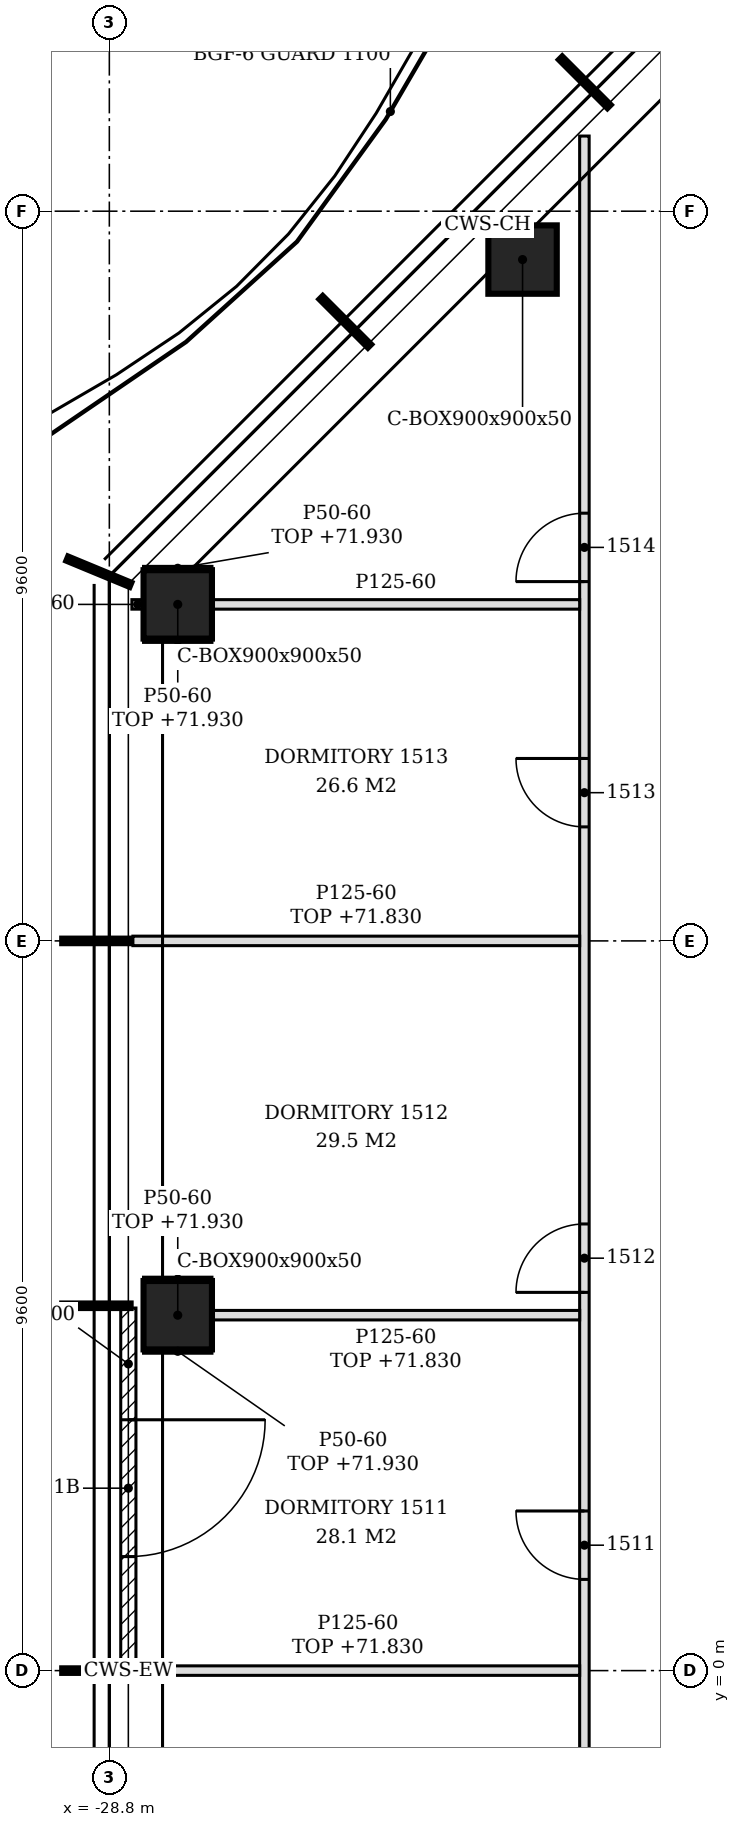
"""IFC4 building model, lengths in metres.
Left out: names, types, materials, properties, quantities, classifications, styles, units other than length and angle.
Written with IfcOpenShell. Run it as: python <this file> out.ifc"""

import sys

from ifc_helpers import new_model, si_unit, direction, frame, frame_2d, origin, origin_2d, place, context, subcontext, project, spatial, polyline, rectangle, hollow_rectangle, outline, extrude, element, fill, save


model = new_model("IFC4")
c1 = context("Model", 3, precision=1e-05, world=origin(), true_north=direction((0.0, 1.0)))
c2 = subcontext(c1, "Body", "Model", "MODEL_VIEW")
j1 = project(units=[si_unit("LENGTHUNIT", "METRE"), si_unit("PLANEANGLEUNIT", "RADIAN")], contexts=[c1])
p1 = place(None, origin())
s1 = spatial("IfcSite", under=j1, at=p1, CompositionType="ELEMENT")
p2 = place(p1, origin())
s2 = spatial("IfcBuilding", under=s1, at=p2, CompositionType="ELEMENT")
p3 = place(p2, frame((0.0, 0.0, 69.0)))
s3 = spatial("IfcBuildingStorey", under=s2, at=p3, CompositionType="ELEMENT", Elevation=69.0)
for number, where, z_axis, x_axis in (
    (1, (-23.364, 18.564, -0.15), (0.0, 0.0, 1.0), (1.0, 0.0, 0.0)),
    (2, (-27.9, 14.027, -0.15), (0.0, 0.0, 1.0), (1.0, 0.0, 0.0)),
    (3, (-27.9, 4.676, -0.15), (0.0, 0.0, 1.0), (1.0, 0.0, 0.0)),
):
    element("IfcColumn", number, at=place(p3, frame(where, z_axis=z_axis, x_axis=x_axis)), inside=s3, PredefinedType="COLUMN", context=c2, shape_type="SweptSolid", body=[
        extrude(hollow_rectangle(XDim=0.9, YDim=0.9, WallThickness=0.05, at=origin_2d()), origin(), (0.0, 0.0, 1.0), 3.6),
    ])
p4 = place(p3, frame((-28.55, 4.77, 0.0), z_axis=(0.0, 0.0, 1.0), x_axis=(0.0, -1.0, 0.0)))
e4 = element("IfcWall", 4, at=p4, inside=s3, PredefinedType="NOTDEFINED", context=c2, shape_type="SweptSolid", body=[
    extrude(rectangle(XDim=4.74, YDim=0.2, at=frame_2d((2.37, 0.0))), origin(), (0.0, 0.0, 1.0), 3.45),
])
p5 = place(p4, frame((1.47, 0.0, 0.0)))
e5 = element("IfcOpeningElement", 5, at=p5, cuts=e4, PredefinedType="OPENING", context=c2, shape_type="SweptSolid", body=[
    extrude(rectangle(XDim=1.8, YDim=2.4, at=frame_2d((0.9, 1.2))), frame((0.0, 0.11, 0.0), z_axis=(0.0, -1.0, 0.0), x_axis=(1.0, 0.0, 0.0)), (0.0, 0.0, 1.0), 0.22),
])
p6 = place(p3, frame((-22.55, -16.087, 0.0), z_axis=(0.0, 0.0, 1.0), x_axis=(0.0, 1.0, 0.0)))
e6 = element("IfcWall", 6, at=p6, inside=s3, PredefinedType="PARTITIONING", context=c2, shape_type="SweptSolid", body=[
    extrude(outline(polyline([(0.0, 0.0), (36.276, 0.0), (36.276, 3.45), (36.022, 3.45), (36.02, 2.63), (34.907, 2.63), (34.905, 3.45), (30.597, 3.45), (30.595, 2.83), (30.377, 2.83), (30.375, 3.45), (25.798, 3.45), (25.795, 2.83), (25.577, 2.83), (25.575, 3.45), (20.998, 3.45), (20.996, 2.83), (20.778, 2.83), (20.775, 3.45), (16.198, 3.45), (16.196, 2.83), (15.978, 2.83), (15.976, 3.45), (11.397, 3.45), (11.396, 2.83), (11.177, 2.83), (11.176, 3.45), (6.597, 3.45), (6.595, 2.83), (6.377, 2.83), (6.375, 3.45), (1.798, 3.45), (1.795, 2.83), (1.577, 2.83), (1.575, 3.45), (0.0, 3.45), (0.0, 0.0)])), frame((0.0, 0.062, 0.0), z_axis=(0.0, -1.0, 0.0), x_axis=(1.0, 0.0, 0.0)), (0.0, 0.0, 1.0), 0.125),
])
p7 = place(p6, frame((10.137, 0.0, 0.0)))
e7 = element("IfcOpeningElement", 7, at=p7, cuts=e6, PredefinedType="OPENING", context=c2, shape_type="SweptSolid", body=[
    extrude(rectangle(XDim=0.9, YDim=2.1, at=frame_2d((0.45, 1.05))), frame((0.0, 0.073, 0.0), z_axis=(0.0, -1.0, 0.0), x_axis=(1.0, 0.0, 0.0)), (0.0, 0.0, 1.0), 0.145),
])
p8 = place(p6, frame((11.711, 0.0, 0.0)))
e8 = element("IfcOpeningElement", 8, at=p8, cuts=e6, PredefinedType="OPENING", context=c2, shape_type="SweptSolid", body=[
    extrude(rectangle(XDim=0.9, YDim=2.1, at=frame_2d((0.45, 1.05))), frame((0.0, 0.073, 0.0), z_axis=(0.0, -1.0, 0.0), x_axis=(1.0, 0.0, 0.0)), (0.0, 0.0, 1.0), 0.145),
])
p9 = place(p6, frame((17.288, 0.0, 0.0)))
e9 = element("IfcOpeningElement", 9, at=p9, cuts=e6, PredefinedType="OPENING", context=c2, shape_type="SweptSolid", body=[
    extrude(rectangle(XDim=0.9, YDim=2.1, at=frame_2d((0.45, 1.05))), frame((0.0, 0.073, 0.0), z_axis=(0.0, -1.0, 0.0), x_axis=(1.0, 0.0, 0.0)), (0.0, 0.0, 1.0), 0.145),
])
p10 = place(p6, frame((21.063, 0.0, 0.0)))
e10 = element("IfcOpeningElement", 10, at=p10, cuts=e6, PredefinedType="OPENING", context=c2, shape_type="SweptSolid", body=[
    extrude(rectangle(XDim=0.9, YDim=2.1, at=frame_2d((0.45, 1.05))), frame((0.0, 0.073, 0.0), z_axis=(0.0, -1.0, 0.0), x_axis=(1.0, 0.0, 0.0)), (0.0, 0.0, 1.0), 0.145),
])
p11 = place(p6, frame((27.188, 0.0, 0.0)))
e11 = element("IfcOpeningElement", 11, at=p11, cuts=e6, PredefinedType="OPENING", context=c2, shape_type="SweptSolid", body=[
    extrude(rectangle(XDim=0.9, YDim=2.1, at=frame_2d((0.45, 1.05))), frame((0.0, 0.073, 0.0), z_axis=(0.0, -1.0, 0.0), x_axis=(1.0, 0.0, 0.0)), (0.0, 0.0, 1.0), 0.145),
])
p12 = place(p6, frame((30.415, 0.0, 0.0)))
e12 = element("IfcOpeningElement", 12, at=p12, cuts=e6, PredefinedType="OPENING", context=c2, shape_type="SweptSolid", body=[
    extrude(rectangle(XDim=0.9, YDim=2.1, at=frame_2d((0.45, 1.05))), frame((0.0, 0.073, 0.0), z_axis=(0.0, -1.0, 0.0), x_axis=(1.0, 0.0, 0.0)), (0.0, 0.0, 1.0), 0.145),
])
p13 = place(p3, frame((-28.45, 0.0, 0.0), z_axis=(0.0, 0.0, 1.0), x_axis=(1.0, 0.0, 0.0)))
e13 = element("IfcWall", 13, at=p13, inside=s3, PredefinedType="PARTITIONING", context=c2, shape_type="SweptSolid", body=[
    extrude(rectangle(XDim=5.837, YDim=0.125, at=frame_2d((2.919, 0.0))), origin(), (0.0, 0.0, 1.0), 2.83),
])
p14 = place(p3, frame((-27.45, 4.676, 0.0), z_axis=(0.0, 0.0, 1.0), x_axis=(1.0, 0.0, 0.0)))
e14 = element("IfcWall", 14, at=p14, inside=s3, PredefinedType="PARTITIONING", context=c2, shape_type="SweptSolid", body=[
    extrude(rectangle(XDim=4.837, YDim=0.125, at=frame_2d((2.419, 0.0))), origin(), (0.0, 0.0, 1.0), 2.83),
])
p15 = place(p3, frame((-28.49, 9.6, 0.0), z_axis=(0.0, 0.0, 1.0), x_axis=(1.0, 0.0, 0.0)))
e15 = element("IfcWall", 15, at=p15, inside=s3, PredefinedType="PARTITIONING", context=c2, shape_type="SweptSolid", body=[
    extrude(rectangle(XDim=5.877, YDim=0.125, at=frame_2d((2.939, 0.0))), origin(), (0.0, 0.0, 1.0), 2.83),
])
p16 = place(p3, frame((-28.503, 14.027, 0.0), z_axis=(0.0, 0.0, 1.0), x_axis=(1.0, 0.0, 0.0)))
e16 = element("IfcWall", 16, at=p16, inside=s3, PredefinedType="PARTITIONING", context=c2, shape_type="SweptSolid", body=[
    extrude(rectangle(XDim=0.153, YDim=0.125, at=frame_2d((0.076, 0.0))), origin(), (0.0, 0.0, 1.0), 3.45),
])
p17 = place(p3, frame((-27.45, 14.027, 0.0), z_axis=(0.0, 0.0, 1.0), x_axis=(1.0, 0.0, 0.0)))
e17 = element("IfcWall", 17, at=p17, inside=s3, PredefinedType="PARTITIONING", context=c2, shape_type="SweptSolid", body=[
    extrude(rectangle(XDim=4.837, YDim=0.125, at=frame_2d((2.419, 0.0))), origin(), (0.0, 0.0, 1.0), 3.45),
])
for number, where, z_axis, x_axis in (
    (18, (-28.35, 5.151, 0.0), (0.0, 0.0, 1.0), (1.0, 0.0, 0.0)),
    (19, (-28.35, 4.201, 0.0), (0.0, 0.0, 1.0), (1.0, 0.0, 0.0)),
    (20, (-28.35, 14.502, 0.0), (0.0, 0.0, 1.0), (1.0, 0.0, 0.0)),
    (21, (-28.35, 13.552, 0.0), (0.0, 0.0, 1.0), (1.0, 0.0, 0.0)),
):
    element("IfcWall", number, at=place(p3, frame(where, z_axis=z_axis, x_axis=x_axis)), inside=s3, PredefinedType="PARTITIONING", context=c2, shape_type="SweptSolid", body=[
        extrude(rectangle(XDim=0.9, YDim=0.05, at=frame_2d((0.45, 0.0))), origin(), (0.0, 0.0, 1.0), 2.93),
    ])
p18 = place(p5, origin())
e22 = element("IfcDoor", 22, at=p18, inside=s3, OperationType="SINGLE_SWING_LEFT", PredefinedType="DOOR", context=c2, shape_type="SweptSolid", body=[
    extrude(rectangle(XDim=1.8, YDim=2.4, at=frame_2d((0.9, 1.2))), frame((0.0, 0.025, 0.0), z_axis=(0.0, -1.0, 0.0), x_axis=(1.0, 0.0, 0.0)), (0.0, 0.0, 1.0), 0.05),
])
fill(e5, e22)
p19 = place(p9, origin())
e23 = element("IfcDoor", 23, at=p19, inside=s3, OperationType="SINGLE_SWING_RIGHT", PredefinedType="DOOR", context=c2, shape_type="SweptSolid", body=[
    extrude(rectangle(XDim=0.9, YDim=2.1, at=frame_2d((0.45, 1.05))), frame((0.0, 0.025, 0.0), z_axis=(0.0, -1.0, 0.0), x_axis=(1.0, 0.0, 0.0)), (0.0, 0.0, 1.0), 0.05),
])
fill(e9, e23)
p20 = place(p10, origin())
e24 = element("IfcDoor", 24, at=p20, inside=s3, OperationType="SINGLE_SWING_LEFT", PredefinedType="DOOR", context=c2, shape_type="SweptSolid", body=[
    extrude(rectangle(XDim=0.9, YDim=2.1, at=frame_2d((0.45, 1.05))), frame((0.0, 0.025, 0.0), z_axis=(0.0, -1.0, 0.0), x_axis=(1.0, 0.0, 0.0)), (0.0, 0.0, 1.0), 0.05),
])
fill(e10, e24)
p21 = place(p11, origin())
e25 = element("IfcDoor", 25, at=p21, inside=s3, OperationType="SINGLE_SWING_RIGHT", PredefinedType="DOOR", context=c2, shape_type="SweptSolid", body=[
    extrude(rectangle(XDim=0.9, YDim=2.1, at=frame_2d((0.45, 1.05))), frame((0.0, 0.025, 0.0), z_axis=(0.0, -1.0, 0.0), x_axis=(1.0, 0.0, 0.0)), (0.0, 0.0, 1.0), 0.05),
])
fill(e11, e25)
p22 = place(p12, origin())
e26 = element("IfcDoor", 26, at=p22, inside=s3, OperationType="SINGLE_SWING_LEFT", PredefinedType="DOOR", context=c2, shape_type="SweptSolid", body=[
    extrude(rectangle(XDim=0.9, YDim=2.1, at=frame_2d((0.45, 1.05))), frame((0.0, 0.025, 0.0), z_axis=(0.0, -1.0, 0.0), x_axis=(1.0, 0.0, 0.0)), (0.0, 0.0, 1.0), 0.05),
])
fill(e12, e26)
save(model, sys.argv[1])
